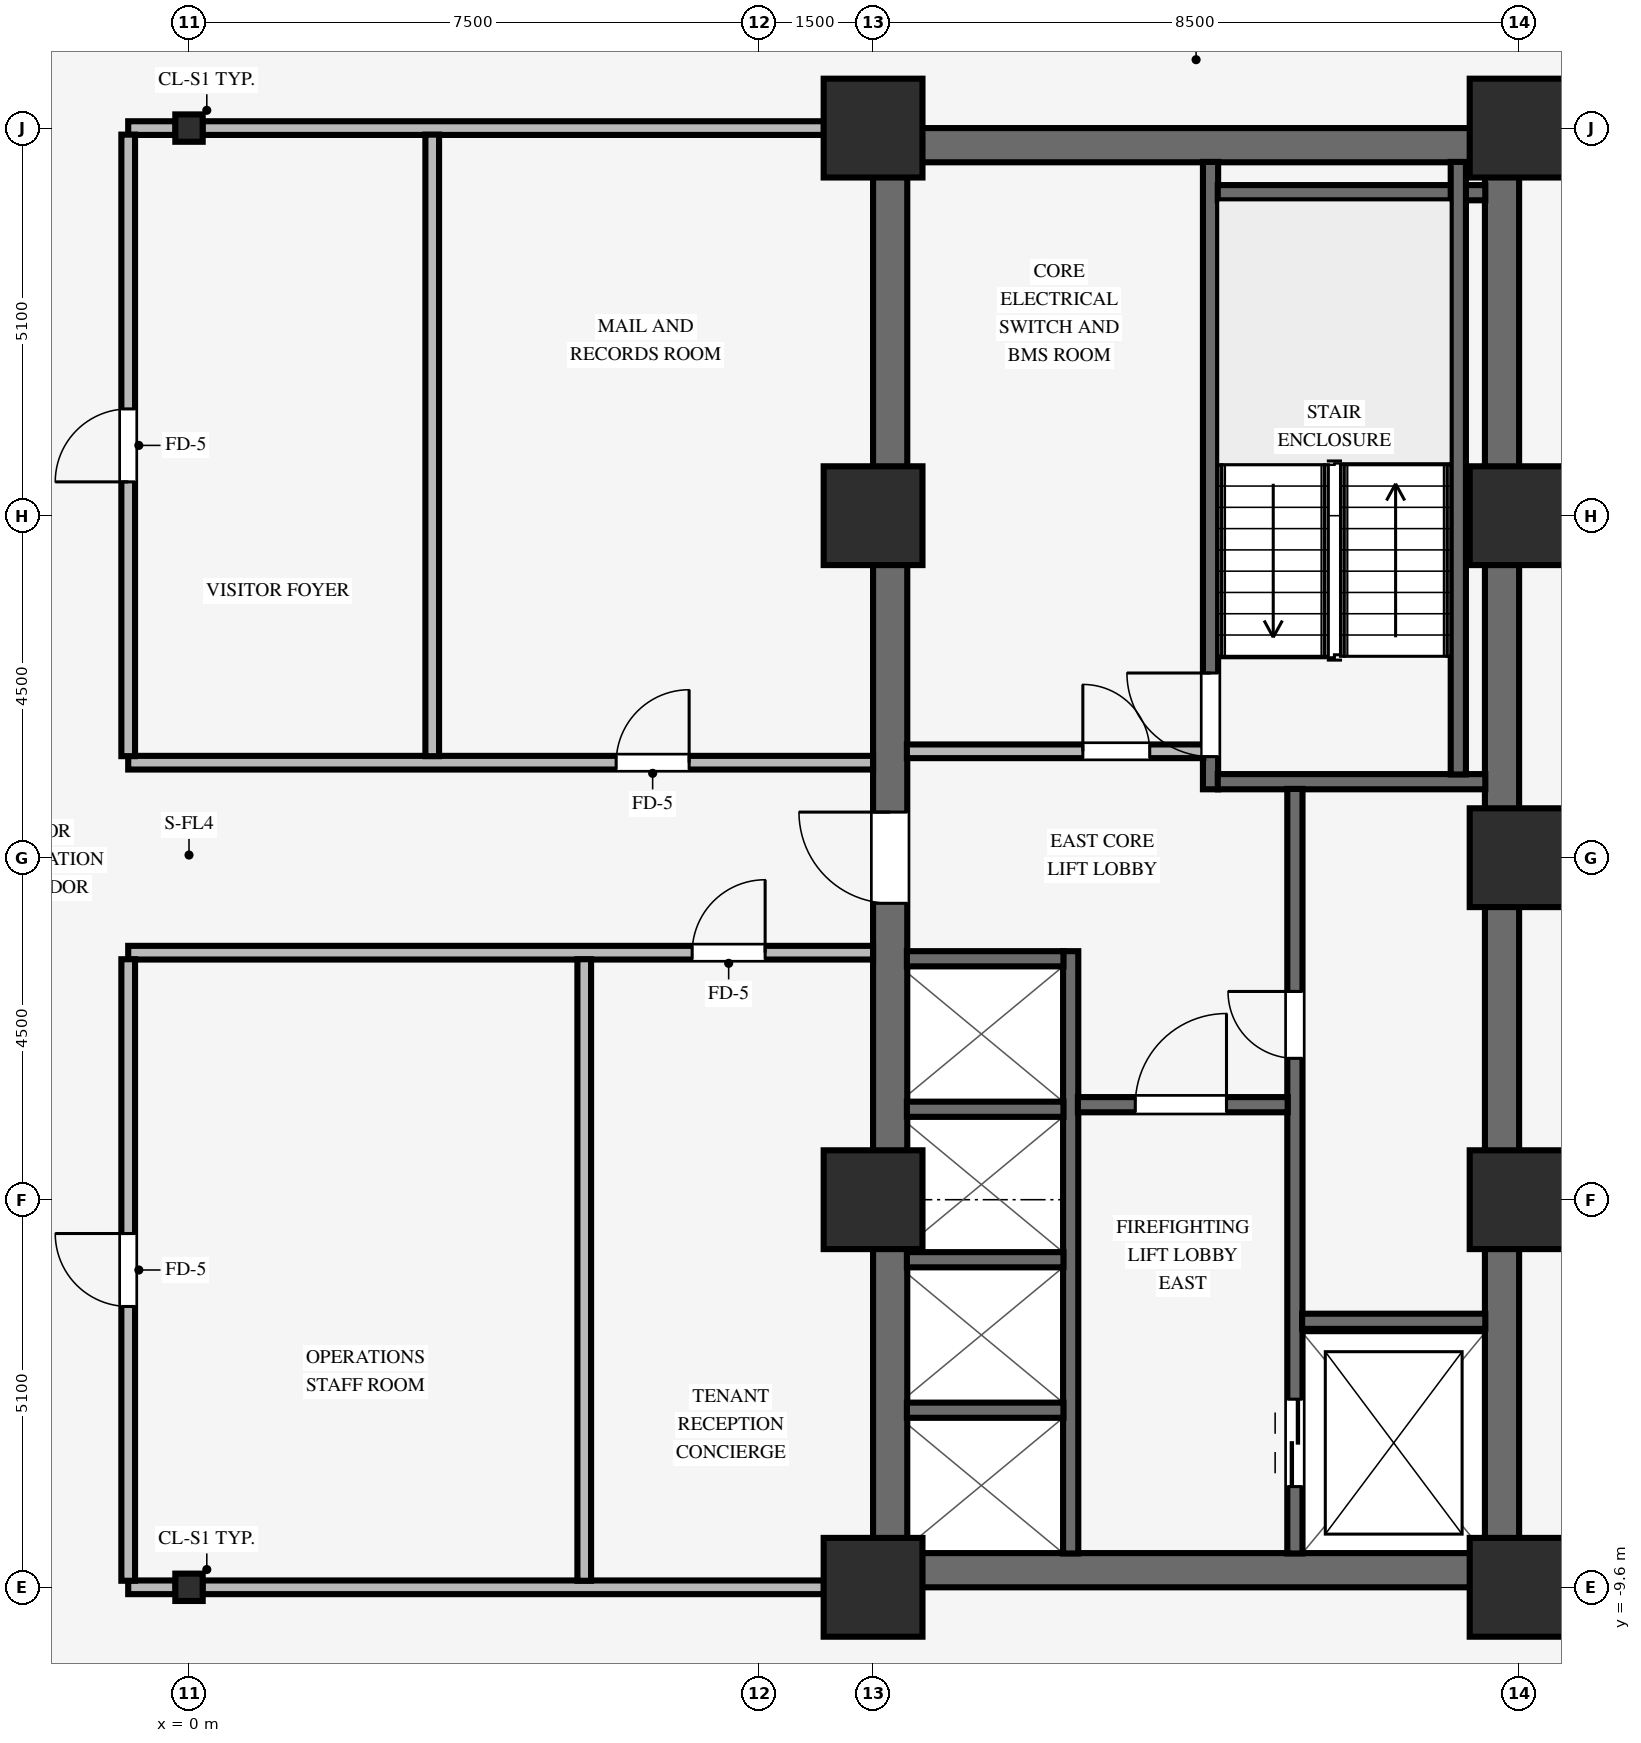
"""IFC4 building model, lengths in metres.
Left out: names, types, materials, properties, quantities, classifications, styles, units other than length and angle.
Written with IfcOpenShell. Run it as: python <this file> out.ifc"""

import sys

from ifc_helpers import new_model, si_unit, direction, frame, frame_2d, origin, origin_2d, place, context, subcontext, project, spatial, rectangle, i_section, extrude, source, transform, mapped, element, fill, save


model = new_model("IFC4")
c1 = context("Model", 3, precision=1e-05, world=origin(), true_north=direction((0.0, 1.0)))
c2 = subcontext(c1, "Body", "Model", "MODEL_VIEW")
j1 = project(units=[si_unit("LENGTHUNIT", "METRE"), si_unit("PLANEANGLEUNIT", "RADIAN")], contexts=[c1])
p1 = place(None, origin())
s1 = spatial("IfcSite", under=j1, at=p1, CompositionType="ELEMENT")
p2 = place(p1, origin())
s2 = spatial("IfcBuilding", under=s1, at=p2, CompositionType="ELEMENT")
p3 = place(p2, frame((0.0, 0.0, 49.5)))
s3 = spatial("IfcBuildingStorey", under=s2, at=p3, CompositionType="ELEMENT", Elevation=49.5)
for number, where, z_axis, x_axis in (
    (1, (9.0, -9.375, 0.0), (0.0, 0.0, 1.0), (1.0, 0.0, 0.0)),
    (2, (9.0, 9.375, 0.0), (0.0, 0.0, 1.0), (1.0, 0.0, 0.0)),
):
    element("IfcWall", number, at=place(p3, frame(where, z_axis=z_axis, x_axis=x_axis)), inside=s3, PredefinedType="SHEAR", context=c2, shape_type="SweptSolid", body=[
        extrude(rectangle(XDim=8.5, YDim=0.45, at=frame_2d((4.25, 0.0))), origin(), (0.0, 0.0, 1.0), 3.37),
    ])
p4 = place(p3, frame((9.225, -9.155, 0.0), z_axis=(0.0, 0.0, 1.0), x_axis=(0.0, 1.0, 0.0)))
e3 = element("IfcWall", 3, at=p4, inside=s3, PredefinedType="SHEAR", context=c2, shape_type="SweptSolid", body=[
    extrude(rectangle(XDim=18.31, YDim=0.45, at=frame_2d((9.155, 0.0))), origin(), (0.0, 0.0, 1.0), 3.37),
])
p5 = place(p4, frame((8.555, 0.0, 0.0)))
e4 = element("IfcOpeningElement", 4, at=p5, cuts=e3, PredefinedType="OPENING", context=c2, shape_type="SweptSolid", body=[
    extrude(rectangle(XDim=1.2, YDim=2.15, at=frame_2d((0.6, 1.075))), frame((0.0, 0.235, 0.0), z_axis=(0.0, -1.0, 0.0), x_axis=(1.0, 0.0, 0.0)), (0.0, 0.0, 1.0), 0.47),
])
p6 = place(p3, frame((17.275, -9.155, 0.0), z_axis=(0.0, 0.0, 1.0), x_axis=(0.0, 1.0, 0.0)))
e5 = element("IfcWall", 5, at=p6, inside=s3, PredefinedType="SHEAR", context=c2, shape_type="SweptSolid", body=[
    extrude(rectangle(XDim=18.31, YDim=0.45, at=frame_2d((9.155, 0.0))), origin(), (0.0, 0.0, 1.0), 3.37),
])
for number, where, z_axis, x_axis in (
    (6, (9.0, -9.6, 0.0), (0.0, 0.0, 1.0), (1.0, 0.0, 0.0)),
    (7, (9.0, -4.5, 0.0), (0.0, 0.0, 1.0), (1.0, 0.0, 0.0)),
    (8, (9.0, 4.5, 0.0), (0.0, 0.0, 1.0), (1.0, 0.0, 0.0)),
    (9, (9.0, 9.6, 0.0), (0.0, 0.0, 1.0), (1.0, 0.0, 0.0)),
    (10, (17.5, -9.6, 0.0), (0.0, 0.0, 1.0), (1.0, 0.0, 0.0)),
    (11, (17.5, -4.5, 0.0), (0.0, 0.0, 1.0), (1.0, 0.0, 0.0)),
    (12, (17.5, 4.5, 0.0), (0.0, 0.0, 1.0), (1.0, 0.0, 0.0)),
    (13, (17.5, 9.6, 0.0), (0.0, 0.0, 1.0), (1.0, 0.0, 0.0)),
    (14, (17.5, 0.0, 0.0), (0.0, 0.0, 1.0), (1.0, 0.0, 0.0)),
):
    element("IfcColumn", number, at=place(p3, frame(where, z_axis=z_axis, x_axis=x_axis)), inside=s3, PredefinedType="COLUMN", context=c2, shape_type="SweptSolid", body=[
        extrude(rectangle(XDim=1.3, YDim=1.3, at=origin_2d()), origin(), (0.0, 0.0, 1.0), 3.37),
    ])
for number, where, z_axis, x_axis in (
    (15, (0.0, -9.6, 0.0), (0.0, 0.0, 1.0), (1.0, 0.0, 0.0)),
    (16, (0.0, 9.6, 0.0), (0.0, 0.0, 1.0), (1.0, 0.0, 0.0)),
):
    element("IfcColumn", number, at=place(p3, frame(where, z_axis=z_axis, x_axis=x_axis)), inside=s3, PredefinedType="COLUMN", context=c2, shape_type="SweptSolid", body=[
        extrude(i_section(OverallWidth=0.36, OverallDepth=0.36, WebThickness=0.021, FlangeThickness=0.021, FilletRadius=0.018, at=origin_2d()), origin(), (0.0, 0.0, 1.0), 3.37),
    ])
p7 = place(p3, frame((13.44, 0.9, 0.0), z_axis=(0.0, 0.0, 1.0), x_axis=(0.0, 1.0, 0.0)))
e17 = element("IfcWall", 17, at=p7, inside=s3, PredefinedType="SHEAR", context=c2, shape_type="SweptSolid", body=[
    extrude(rectangle(XDim=8.255, YDim=0.2, at=frame_2d((4.127, 0.0))), origin(), (0.0, 0.0, 1.0), 3.37),
])
p8 = place(p7, frame((0.43, 0.0, 0.0)))
e18 = element("IfcOpeningElement", 18, at=p8, cuts=e17, PredefinedType="OPENING", context=c2, shape_type="SweptSolid", body=[
    extrude(rectangle(XDim=1.1, YDim=2.15, at=frame_2d((0.55, 1.075))), frame((0.0, 0.11, 0.0), z_axis=(0.0, -1.0, 0.0), x_axis=(1.0, 0.0, 0.0)), (0.0, 0.0, 1.0), 0.22),
])
for number, where, z_axis, x_axis in (
    (19, (13.535, 1.0, 0.0), (0.0, 0.0, 1.0), (1.0, 0.0, 0.0)),
    (20, (13.535, 8.75, 0.0), (0.0, 0.0, 1.0), (1.0, 0.0, 0.0)),
):
    element("IfcWall", number, at=place(p3, frame(where, z_axis=z_axis, x_axis=x_axis)), inside=s3, PredefinedType="SHEAR", context=c2, shape_type="SweptSolid", body=[
        extrude(rectangle(XDim=3.52, YDim=0.2, at=frame_2d((1.76, 0.0))), origin(), (0.0, 0.0, 1.0), 3.37),
    ])
p9 = place(p3, frame((16.7, 1.095, 0.0), z_axis=(0.0, 0.0, 1.0), x_axis=(0.0, 1.0, 0.0)))
e21 = element("IfcWall", 21, at=p9, inside=s3, PredefinedType="SHEAR", context=c2, shape_type="SweptSolid", body=[
    extrude(rectangle(XDim=8.06, YDim=0.2, at=frame_2d((4.03, 0.0))), origin(), (0.0, 0.0, 1.0), 3.37),
])
p10 = place(p3, frame((14.55, -9.155, 0.0), z_axis=(0.0, 0.0, 1.0), x_axis=(0.0, 1.0, 0.0)))
e22 = element("IfcWall", 22, at=p10, inside=s3, PredefinedType="SHEAR", context=c2, shape_type="SweptSolid", body=[
    extrude(rectangle(XDim=10.06, YDim=0.2, at=frame_2d((5.03, 0.0))), origin(), (0.0, 0.0, 1.0), 3.37),
])
p11 = place(p10, frame((6.515, 0.0, 0.0)))
e23 = element("IfcOpeningElement", 23, at=p11, cuts=e22, PredefinedType="OPENING", context=c2, shape_type="SweptSolid", body=[
    extrude(rectangle(XDim=0.88, YDim=2.1, at=frame_2d((0.44, 1.05))), frame((0.0, 0.11, 0.0), z_axis=(0.0, -1.0, 0.0), x_axis=(1.0, 0.0, 0.0)), (0.0, 0.0, 1.0), 0.22),
])
p12 = place(p10, frame((0.88, 0.0, 0.0)))
e24 = element("IfcOpeningElement", 24, at=p12, cuts=e22, PredefinedType="OPENING", context=c2, shape_type="SweptSolid", body=[
    extrude(rectangle(XDim=1.15, YDim=2.15, at=frame_2d((0.575, 1.075))), frame((0.0, 0.11, 0.0), z_axis=(0.0, -1.0, 0.0), x_axis=(1.0, 0.0, 0.0)), (0.0, 0.0, 1.0), 0.22),
])
p13 = place(p3, frame((14.645, -6.1, 0.0), z_axis=(0.0, 0.0, 1.0), x_axis=(1.0, 0.0, 0.0)))
e25 = element("IfcWall", 25, at=p13, inside=s3, PredefinedType="SHEAR", context=c2, shape_type="SweptSolid", body=[
    extrude(rectangle(XDim=2.41, YDim=0.2, at=frame_2d((1.205, 0.0))), origin(), (0.0, 0.0, 1.0), 3.37),
])
p14 = place(p3, frame((11.6, -9.155, 0.0), z_axis=(0.0, 0.0, 1.0), x_axis=(0.0, 1.0, 0.0)))
e26 = element("IfcWall", 26, at=p14, inside=s3, PredefinedType="SHEAR", context=c2, shape_type="SweptSolid", body=[
    extrude(rectangle(XDim=7.925, YDim=0.2, at=frame_2d((3.962, 0.0))), origin(), (0.0, 0.0, 1.0), 3.37),
])
p15 = place(p3, frame((11.695, -3.25, 0.0), z_axis=(0.0, 0.0, 1.0), x_axis=(1.0, 0.0, 0.0)))
e27 = element("IfcWall", 27, at=p15, inside=s3, PredefinedType="SHEAR", context=c2, shape_type="SweptSolid", body=[
    extrude(rectangle(XDim=2.76, YDim=0.2, at=frame_2d((1.38, 0.0))), origin(), (0.0, 0.0, 1.0), 3.37),
])
p16 = place(p15, frame((0.755, 0.0, 0.0)))
e28 = element("IfcOpeningElement", 28, at=p16, cuts=e27, PredefinedType="OPENING", context=c2, shape_type="SweptSolid", body=[
    extrude(rectangle(XDim=1.2, YDim=2.15, at=frame_2d((0.6, 1.075))), frame((0.0, 0.11, 0.0), z_axis=(0.0, -1.0, 0.0), x_axis=(1.0, 0.0, 0.0)), (0.0, 0.0, 1.0), 0.22),
])
for number, where, z_axis, x_axis in (
    (29, (9.445, -7.27, 0.0), (0.0, 0.0, 1.0), (1.0, 0.0, 0.0)),
    (30, (9.445, -5.29, 0.0), (0.0, 0.0, 1.0), (1.0, 0.0, 0.0)),
    (31, (9.445, -3.31, 0.0), (0.0, 0.0, 1.0), (1.0, 0.0, 0.0)),
    (32, (9.445, -1.33, 0.0), (0.0, 0.0, 1.0), (1.0, 0.0, 0.0)),
):
    element("IfcWall", number, at=place(p3, frame(where, z_axis=z_axis, x_axis=x_axis)), inside=s3, PredefinedType="SHEAR", context=c2, shape_type="SweptSolid", body=[
        extrude(rectangle(XDim=2.06, YDim=0.2, at=frame_2d((1.03, 0.0))), origin(), (0.0, 0.0, 1.0), 3.37),
    ])
p17 = place(p3, frame((9.445, 1.4, 0.0), z_axis=(0.0, 0.0, 1.0), x_axis=(1.0, 0.0, 0.0)))
e33 = element("IfcWall", 33, at=p17, inside=s3, PredefinedType="PARTITIONING", context=c2, shape_type="SweptSolid", body=[
    extrude(rectangle(XDim=3.9, YDim=0.18, at=frame_2d((1.95, 0.0))), origin(), (0.0, 0.0, 1.0), 3.36),
])
p18 = place(p17, frame((2.315, 0.0, 0.0)))
e34 = element("IfcOpeningElement", 34, at=p18, cuts=e33, PredefinedType="OPENING", context=c2, shape_type="SweptSolid", body=[
    extrude(rectangle(XDim=0.88, YDim=2.1, at=frame_2d((0.44, 1.05))), frame((0.0, 0.1, 0.0), z_axis=(0.0, -1.0, 0.0), x_axis=(1.0, 0.0, 0.0)), (0.0, 0.0, 1.0), 0.2),
])
p19 = place(p3, frame((-0.8, -9.6, 0.0), z_axis=(0.0, 0.0, 1.0), x_axis=(1.0, 0.0, 0.0)))
e35 = element("IfcWall", 35, at=p19, inside=s3, PredefinedType="PARTITIONING", context=c2, shape_type="SweptSolid", body=[
    extrude(rectangle(XDim=0.624, YDim=0.18, at=frame_2d((0.312, 0.0))), origin(), (0.0, 0.0, 1.0), 2.405),
])
p20 = place(p3, frame((0.176, -9.6, 0.0), z_axis=(0.0, 0.0, 1.0), x_axis=(1.0, 0.0, 0.0)))
e36 = element("IfcWall", 36, at=p20, inside=s3, PredefinedType="PARTITIONING", context=c2, shape_type="SweptSolid", body=[
    extrude(rectangle(XDim=8.178, YDim=0.18, at=frame_2d((4.089, 0.0))), origin(), (0.0, 0.0, 1.0), 2.405),
])
p21 = place(p3, frame((-0.8, -1.25, 0.0), z_axis=(0.0, 0.0, 1.0), x_axis=(1.0, 0.0, 0.0)))
e37 = element("IfcWall", 37, at=p21, inside=s3, PredefinedType="PARTITIONING", context=c2, shape_type="SweptSolid", body=[
    extrude(rectangle(XDim=9.8, YDim=0.18, at=frame_2d((4.9, 0.0))), origin(), (0.0, 0.0, 1.0), 3.36),
])
p22 = place(p21, frame((7.42, 0.0, 0.0)))
e38 = element("IfcOpeningElement", 38, at=p22, cuts=e37, PredefinedType="OPENING", context=c2, shape_type="SweptSolid", body=[
    extrude(rectangle(XDim=0.96, YDim=2.1, at=frame_2d((0.48, 1.05))), frame((0.0, 0.1, 0.0), z_axis=(0.0, -1.0, 0.0), x_axis=(1.0, 0.0, 0.0)), (0.0, 0.0, 1.0), 0.2),
])
p23 = place(p3, frame((-0.8, 1.25, 0.0), z_axis=(0.0, 0.0, 1.0), x_axis=(1.0, 0.0, 0.0)))
e39 = element("IfcWall", 39, at=p23, inside=s3, PredefinedType="PARTITIONING", context=c2, shape_type="SweptSolid", body=[
    extrude(rectangle(XDim=9.8, YDim=0.18, at=frame_2d((4.9, 0.0))), origin(), (0.0, 0.0, 1.0), 3.36),
])
p24 = place(p23, frame((6.42, 0.0, 0.0)))
e40 = element("IfcOpeningElement", 40, at=p24, cuts=e39, PredefinedType="OPENING", context=c2, shape_type="SweptSolid", body=[
    extrude(rectangle(XDim=0.96, YDim=2.1, at=frame_2d((0.48, 1.05))), frame((0.0, 0.1, 0.0), z_axis=(0.0, -1.0, 0.0), x_axis=(1.0, 0.0, 0.0)), (0.0, 0.0, 1.0), 0.2),
])
p25 = place(p3, frame((-0.8, 9.6, 0.0), z_axis=(0.0, 0.0, 1.0), x_axis=(1.0, 0.0, 0.0)))
e41 = element("IfcWall", 41, at=p25, inside=s3, PredefinedType="PARTITIONING", context=c2, shape_type="SweptSolid", body=[
    extrude(rectangle(XDim=0.624, YDim=0.18, at=frame_2d((0.312, 0.0))), origin(), (0.0, 0.0, 1.0), 2.405),
])
p26 = place(p3, frame((0.176, 9.6, 0.0), z_axis=(0.0, 0.0, 1.0), x_axis=(1.0, 0.0, 0.0)))
e42 = element("IfcWall", 42, at=p26, inside=s3, PredefinedType="PARTITIONING", context=c2, shape_type="SweptSolid", body=[
    extrude(rectangle(XDim=8.178, YDim=0.18, at=frame_2d((4.089, 0.0))), origin(), (0.0, 0.0, 1.0), 2.405),
])
p27 = place(p3, frame((-0.8, -9.514, 0.0), z_axis=(0.0, 0.0, 1.0), x_axis=(0.0, 1.0, 0.0)))
e43 = element("IfcWall", 43, at=p27, inside=s3, PredefinedType="PARTITIONING", context=c2, shape_type="SweptSolid", body=[
    extrude(rectangle(XDim=8.178, YDim=0.18, at=frame_2d((4.089, 0.0))), origin(), (0.0, 0.0, 1.0), 3.36),
])
p28 = place(p27, frame((3.609, 0.0, 0.0)))
e44 = element("IfcOpeningElement", 44, at=p28, cuts=e43, PredefinedType="OPENING", context=c2, shape_type="SweptSolid", body=[
    extrude(rectangle(XDim=0.96, YDim=2.1, at=frame_2d((0.48, 1.05))), frame((0.0, 0.1, 0.0), z_axis=(0.0, -1.0, 0.0), x_axis=(1.0, 0.0, 0.0)), (0.0, 0.0, 1.0), 0.2),
])
p29 = place(p3, frame((-0.8, 1.336, 0.0), z_axis=(0.0, 0.0, 1.0), x_axis=(0.0, 1.0, 0.0)))
e45 = element("IfcWall", 45, at=p29, inside=s3, PredefinedType="PARTITIONING", context=c2, shape_type="SweptSolid", body=[
    extrude(rectangle(XDim=8.178, YDim=0.18, at=frame_2d((4.089, 0.0))), origin(), (0.0, 0.0, 1.0), 3.36),
])
p30 = place(p29, frame((3.609, 0.0, 0.0)))
e46 = element("IfcOpeningElement", 46, at=p30, cuts=e45, PredefinedType="OPENING", context=c2, shape_type="SweptSolid", body=[
    extrude(rectangle(XDim=0.96, YDim=2.1, at=frame_2d((0.48, 1.05))), frame((0.0, 0.1, 0.0), z_axis=(0.0, -1.0, 0.0), x_axis=(1.0, 0.0, 0.0)), (0.0, 0.0, 1.0), 0.2),
])
for number, where, z_axis, x_axis in (
    (47, (3.2, 1.336, 0.0), (0.0, 0.0, 1.0), (0.0, 1.0, 0.0)),
    (48, (5.2, -9.514, 0.0), (0.0, 0.0, 1.0), (0.0, 1.0, 0.0)),
):
    element("IfcWall", number, at=place(p3, frame(where, z_axis=z_axis, x_axis=x_axis)), inside=s3, PredefinedType="PARTITIONING", context=c2, shape_type="SweptSolid", body=[
        extrude(rectangle(XDim=8.178, YDim=0.18, at=frame_2d((4.089, 0.0))), origin(), (0.0, 0.0, 1.0), 3.36),
    ])
m1 = source(origin(), c2, "Body", "SweptSolid", [
    extrude(rectangle(XDim=1.1, YDim=2.15, at=frame_2d((0.55, 1.075))), frame((0.0, 0.025, 0.0), z_axis=(0.0, -1.0, 0.0), x_axis=(1.0, 0.0, 0.0)), (0.0, 0.0, 1.0), 0.05),
])
p31 = place(p8, origin())
e49 = element("IfcDoor", 49, at=p31, inside=s3, OperationType="SINGLE_SWING_RIGHT", PredefinedType="DOOR", context=c2, shape_type="MappedRepresentation", body=[
    mapped(m1, transform((0.0, 0.0, 0.0), scale=1.0)),
])
fill(e18, e49)
m2 = source(origin(), c2, "Body", "SweptSolid", [
    extrude(rectangle(XDim=0.88, YDim=2.1, at=frame_2d((0.44, 1.05))), frame((0.0, 0.025, 0.0), z_axis=(0.0, -1.0, 0.0), x_axis=(1.0, 0.0, 0.0)), (0.0, 0.0, 1.0), 0.05),
])
p32 = place(p11, origin())
e50 = element("IfcDoor", 50, at=p32, inside=s3, OperationType="SINGLE_SWING_RIGHT", PredefinedType="DOOR", context=c2, shape_type="MappedRepresentation", body=[
    mapped(m2, transform((0.0, 0.0, 0.0), scale=1.0)),
])
fill(e23, e50)
m3 = source(origin(), c2, "Body", "SweptSolid", [
    extrude(rectangle(XDim=1.2, YDim=2.15, at=frame_2d((0.6, 1.075))), frame((0.0, 0.025, 0.0), z_axis=(0.0, -1.0, 0.0), x_axis=(1.0, 0.0, 0.0)), (0.0, 0.0, 1.0), 0.05),
])
p33 = place(p16, origin())
e51 = element("IfcDoor", 51, at=p33, inside=s3, OperationType="SINGLE_SWING_RIGHT", PredefinedType="DOOR", context=c2, shape_type="MappedRepresentation", body=[
    mapped(m3, transform((0.0, 0.0, 0.0), scale=1.0)),
])
fill(e28, e51)
p34 = place(p5, origin())
e52 = element("IfcDoor", 52, at=p34, inside=s3, OperationType="SINGLE_SWING_RIGHT", PredefinedType="DOOR", context=c2, shape_type="MappedRepresentation", body=[
    mapped(m3, transform((0.0, 0.0, 0.0), scale=1.0)),
])
fill(e4, e52)
p35 = place(p18, origin())
e53 = element("IfcDoor", 53, at=p35, inside=s3, OperationType="SINGLE_SWING_LEFT", PredefinedType="DOOR", context=c2, shape_type="MappedRepresentation", body=[
    mapped(m2, transform((0.0, 0.0, 0.0), scale=1.0)),
])
fill(e34, e53)
m4 = source(origin(), c2, "Body", "SweptSolid", [
    extrude(rectangle(XDim=1.15, YDim=2.15, at=frame_2d((0.575, 1.075))), frame((0.0, 0.025, 0.0), z_axis=(0.0, -1.0, 0.0), x_axis=(1.0, 0.0, 0.0)), (0.0, 0.0, 1.0), 0.05),
])
p36 = place(p12, origin())
e54 = element("IfcDoor", 54, at=p36, inside=s3, OperationType="DOUBLE_DOOR_SLIDING", PredefinedType="DOOR", context=c2, shape_type="MappedRepresentation", body=[
    mapped(m4, transform((0.0, 0.0, 0.0), scale=1.0)),
])
fill(e24, e54)
m5 = source(origin(), c2, "Body", "SweptSolid", [
    extrude(rectangle(XDim=0.96, YDim=2.1, at=frame_2d((0.48, 1.05))), frame((0.0, 0.025, 0.0), z_axis=(0.0, -1.0, 0.0), x_axis=(1.0, 0.0, 0.0)), (0.0, 0.0, 1.0), 0.05),
])
p37 = place(p30, origin())
e55 = element("IfcDoor", 55, at=p37, inside=s3, OperationType="SINGLE_SWING_LEFT", PredefinedType="DOOR", context=c2, shape_type="MappedRepresentation", body=[
    mapped(m5, transform((0.0, 0.0, 0.0), scale=1.0)),
])
fill(e46, e55)
p38 = place(p28, origin())
e56 = element("IfcDoor", 56, at=p38, inside=s3, OperationType="SINGLE_SWING_RIGHT", PredefinedType="DOOR", context=c2, shape_type="MappedRepresentation", body=[
    mapped(m5, transform((0.0, 0.0, 0.0), scale=1.0)),
])
fill(e44, e56)
p39 = place(p24, origin())
e57 = element("IfcDoor", 57, at=p39, inside=s3, OperationType="SINGLE_SWING_RIGHT", PredefinedType="DOOR", context=c2, shape_type="MappedRepresentation", body=[
    mapped(m5, transform((0.0, 0.0, 0.0), scale=1.0)),
])
fill(e40, e57)
p40 = place(p22, origin())
e58 = element("IfcDoor", 58, at=p40, inside=s3, OperationType="SINGLE_SWING_RIGHT", PredefinedType="DOOR", context=c2, shape_type="MappedRepresentation", body=[
    mapped(m5, transform((0.0, 0.0, 0.0), scale=1.0)),
])
fill(e38, e58)
save(model, sys.argv[1])
